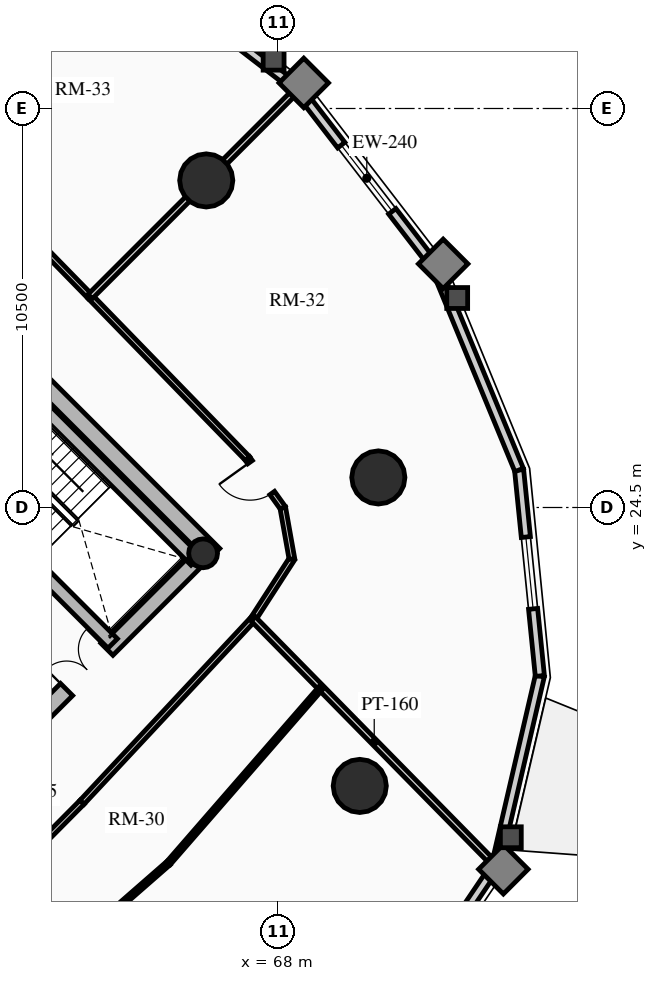
"""IFC4 building model, lengths in metres.
Left out: names, types, materials, properties, quantities, classifications, styles, units other than length and angle.
Written with IfcOpenShell. Run it as: python <this file> out.ifc"""

import sys

from ifc_helpers import new_model, si_unit, direction, frame, frame_2d, origin, origin_2d, place, context, subcontext, project, spatial, rectangle, circle, hollow_circle, extrude, source, transform, mapped, element, fill, save


model = new_model("IFC4")
c1 = context("Model", 3, precision=1e-05, world=origin(), true_north=direction((0.0, 1.0)))
c2 = subcontext(c1, "Body", "Model", "MODEL_VIEW")
j1 = project(units=[si_unit("LENGTHUNIT", "METRE"), si_unit("PLANEANGLEUNIT", "RADIAN")], contexts=[c1])
p1 = place(None, origin())
s1 = spatial("IfcSite", under=j1, at=p1, CompositionType="ELEMENT")
p2 = place(p1, origin())
s2 = spatial("IfcBuilding", under=s1, at=p2, CompositionType="ELEMENT")
p3 = place(p2, frame((0.0, 0.0, 93.43)))
s3 = spatial("IfcBuildingStorey", under=s2, at=p3, CompositionType="ELEMENT", Elevation=93.43)
p4 = place(p3, frame((66.303, 23.263, 0.0), z_axis=(0.0, 0.0, 1.0), x_axis=(-0.707106781187, 0.707106781187, 0.0)))
e1 = element("IfcWall", 1, at=p4, inside=s3, PredefinedType="SHEAR", context=c2, shape_type="SweptSolid", body=[
    extrude(rectangle(XDim=14.2, YDim=0.45, at=frame_2d((7.1, 0.0))), origin(), (0.0, 0.0, 1.0), 2.91),
])
p5 = place(p3, frame((58.578, 15.856, 0.0), z_axis=(0.0, 0.0, 1.0), x_axis=(0.707106781187, 0.707106781187, 0.0)))
e2 = element("IfcWall", 2, at=p5, inside=s3, PredefinedType="SHEAR", context=c2, shape_type="SweptSolid", body=[
    extrude(rectangle(XDim=10.7, YDim=0.45, at=frame_2d((5.35, 0.0))), origin(), (0.0, 0.0, 1.0), 2.91),
])
m1 = source(origin(), c2, "Body", "SweptSolid", [
    extrude(rectangle(XDim=1.5, YDim=2.02, at=frame_2d((0.75, 1.01))), frame((0.0, 0.235, 0.0), z_axis=(0.0, -1.0, 0.0), x_axis=(1.0, 0.0, 0.0)), (0.0, 0.0, 1.0), 0.47),
])
p6 = place(p5, frame((5.45, 0.0, 0.0)))
e3 = element("IfcOpeningElement", 3, at=p6, cuts=e2, PredefinedType="OPENING", context=c2, shape_type="MappedRepresentation", body=[
    mapped(m1, transform((0.0, 0.0, 0.0), x_axis=(1.0, 0.0, 0.0), y_axis=(0.0, 1.0, 0.0), z_axis=(0.0, 0.0, 1.0), scale=1.0)),
])
p7 = place(p3, frame((63.645, 20.922, 0.0), z_axis=(0.0, 0.0, 1.0), x_axis=(-0.707106781187, 0.707106781187, 0.0)))
e4 = element("IfcWall", 4, at=p7, inside=s3, PredefinedType="SHEAR", context=c2, shape_type="SweptSolid", body=[
    extrude(rectangle(XDim=13.75, YDim=0.35, at=frame_2d((6.875, 0.0))), origin(), (0.0, 0.0, 1.0), 2.91),
])
m2 = source(origin(), c2, "Body", "SweptSolid", [
    extrude(rectangle(XDim=1.1, YDim=2.015, at=frame_2d((0.55, 1.007))), frame((0.0, 0.185, 0.0), z_axis=(0.0, -1.0, 0.0), x_axis=(1.0, 0.0, 0.0)), (0.0, 0.0, 1.0), 0.37),
])
p8 = place(p7, frame((10.0, 0.0, 0.0)))
e5 = element("IfcOpeningElement", 5, at=p8, cuts=e4, PredefinedType="OPENING", context=c2, shape_type="MappedRepresentation", body=[
    mapped(m2, transform((0.0, 0.0, 0.0), x_axis=(1.0, 0.0, 0.0), y_axis=(0.0, 1.0, 0.0), z_axis=(0.0, 0.0, 1.0), scale=1.0)),
])
p9 = place(p7, frame((12.0, 0.0, 0.0)))
e6 = element("IfcOpeningElement", 6, at=p9, cuts=e4, PredefinedType="OPENING", context=c2, shape_type="MappedRepresentation", body=[
    mapped(m2, transform((0.0, 0.0, 0.0), x_axis=(1.0, 0.0, 0.0), y_axis=(0.0, 1.0, 0.0), z_axis=(0.0, 0.0, 1.0), scale=1.0)),
])
m3 = source(origin(), c2, "Body", "SweptSolid", [
    extrude(rectangle(XDim=1.15, YDim=2.02, at=frame_2d((0.575, 1.01))), frame((0.0, 0.185, 0.0), z_axis=(0.0, -1.0, 0.0), x_axis=(1.0, 0.0, 0.0)), (0.0, 0.0, 1.0), 0.37),
])
p10 = place(p7, frame((5.305, 0.0, 0.0)))
e7 = element("IfcOpeningElement", 7, at=p10, cuts=e4, PredefinedType="OPENING", context=c2, shape_type="MappedRepresentation", body=[
    mapped(m3, transform((0.0, 0.0, 0.0), x_axis=(1.0, 0.0, 0.0), y_axis=(0.0, 1.0, 0.0), z_axis=(0.0, 0.0, 1.0), scale=1.0)),
])
p11 = place(p3, frame((65.83, 23.107, 0.0), z_axis=(0.0, 0.0, 1.0), x_axis=(-0.707088616009, 0.707124945897, 0.0)))
e8 = element("IfcWall", 8, at=p11, inside=s3, PredefinedType="SHEAR", context=c2, shape_type="SweptSolid", body=[
    extrude(rectangle(XDim=6.72, YDim=0.35, at=frame_2d((3.36, 0.0))), origin(), (0.0, 0.0, 1.0), 2.91),
])
p12 = place(p3, frame((66.024, 23.294, 0.0), z_axis=(0.0, 0.0, 1.0), x_axis=(0.707106781187, 0.707106781187, 0.0)))
e9 = element("IfcColumn", 9, at=p12, inside=s3, PredefinedType="COLUMN", context=c2, shape_type="SweptSolid", body=[
    extrude(hollow_circle(Radius=0.38, WallThickness=0.032, at=origin_2d()), origin(), (0.0, 0.0, 1.0), 2.91),
])
for number, where, z_axis, x_axis in (
    (10, (66.107, 33.107, 0.0), (0.0, 0.0, 1.0), (1.0, 0.0, 0.0)),
    (11, (70.146, 17.173, 0.0), (0.0, 0.0, 1.0), (1.0, 0.0, 0.0)),
    (12, (70.635, 25.291, 0.0), (0.0, 0.0, 1.0), (1.0, 0.0, 0.0)),
):
    element("IfcColumn", number, at=place(p3, frame(where, z_axis=z_axis, x_axis=x_axis)), inside=s3, PredefinedType="USERDEFINED", context=c2, shape_type="SweptSolid", body=[
        extrude(circle(Radius=0.7, at=origin_2d()), origin(), (0.0, 0.0, 1.0), 2.91),
    ])
p13 = place(p3, frame((63.811, 39.145, 0.0), z_axis=(0.0, 0.0, 1.0), x_axis=(0.791982052206, -0.61054437102, 0.0)))
e13 = element("IfcWall", 13, at=p13, inside=s3, PredefinedType="SOLIDWALL", context=c2, shape_type="SweptSolid", body=[
    extrude(rectangle(XDim=5.942, YDim=0.24, at=frame_2d((2.971, 0.0))), origin(), (0.0, 0.0, 1.0), 2.179),
])
p14 = place(p3, frame((73.729, 15.08, 0.0), z_axis=(0.0, 0.0, 1.0), x_axis=(-0.559572880421, -0.828781148131, 0.0)))
e14 = element("IfcWall", 14, at=p14, inside=s3, PredefinedType="SOLIDWALL", context=c2, shape_type="SweptSolid", body=[
    extrude(rectangle(XDim=4.905, YDim=0.24, at=frame_2d((2.452, 0.0))), origin(), (0.0, 0.0, 1.0), 2.179),
])
m4 = source(origin(), c2, "Body", "SweptSolid", [
    extrude(rectangle(XDim=1.9, YDim=1.35, at=frame_2d((0.95, 0.675))), frame((0.0, 0.13, 0.0), z_axis=(0.0, -1.0, 0.0), x_axis=(1.0, 0.0, 0.0)), (0.0, 0.0, 1.0), 0.26),
])
p15 = place(p14, frame((1.502, 0.0, 0.65)))
e15 = element("IfcOpeningElement", 15, at=p15, cuts=e14, PredefinedType="OPENING", context=c2, shape_type="MappedRepresentation", body=[
    mapped(m4, transform((0.0, 0.0, 0.0), x_axis=(1.0, 0.0, 0.0), y_axis=(0.0, 1.0, 0.0), z_axis=(0.0, 0.0, 1.0), scale=1.0)),
])
p16 = place(p3, frame((74.885, 20.067, 0.0), z_axis=(0.0, 0.0, 1.0), x_axis=(-0.225834725257, -0.974165631126, 0.0)))
e16 = element("IfcWall", 16, at=p16, inside=s3, PredefinedType="SOLIDWALL", context=c2, shape_type="SweptSolid", body=[
    extrude(rectangle(XDim=5.119, YDim=0.24, at=frame_2d((2.56, 0.0))), origin(), (0.0, 0.0, 1.0), 2.179),
])
p17 = place(p3, frame((74.339, 25.487, 0.0), z_axis=(0.0, 0.0, 1.0), x_axis=(0.10015591906, -0.994971754311, 0.0)))
e17 = element("IfcWall", 17, at=p17, inside=s3, PredefinedType="SOLIDWALL", context=c2, shape_type="SweptSolid", body=[
    extrude(rectangle(XDim=5.448, YDim=0.24, at=frame_2d((2.724, 0.0))), origin(), (0.0, 0.0, 1.0), 2.179),
])
p18 = place(p17, frame((1.774, 0.0, 0.65)))
e18 = element("IfcOpeningElement", 18, at=p18, cuts=e17, PredefinedType="OPENING", context=c2, shape_type="MappedRepresentation", body=[
    mapped(m4, transform((0.0, 0.0, 0.0), x_axis=(1.0, 0.0, 0.0), y_axis=(0.0, 1.0, 0.0), z_axis=(0.0, 0.0, 1.0), scale=1.0)),
])
p19 = place(p3, frame((72.145, 30.811, 0.0), z_axis=(0.0, 0.0, 1.0), x_axis=(0.381027003055, -0.924563909604, 0.0)))
e19 = element("IfcWall", 19, at=p19, inside=s3, PredefinedType="SOLIDWALL", context=c2, shape_type="SweptSolid", body=[
    extrude(rectangle(XDim=5.758, YDim=0.24, at=frame_2d((2.879, 0.0))), origin(), (0.0, 0.0, 1.0), 2.179),
])
p20 = place(p3, frame((68.517, 35.517, 0.0), z_axis=(0.0, 0.0, 1.0), x_axis=(0.61054437102, -0.791982052206, 0.0)))
e20 = element("IfcWall", 20, at=p20, inside=s3, PredefinedType="SOLIDWALL", context=c2, shape_type="SweptSolid", body=[
    extrude(rectangle(XDim=5.942, YDim=0.24, at=frame_2d((2.971, 0.0))), origin(), (0.0, 0.0, 1.0), 2.179),
])
m5 = source(origin(), c2, "Body", "SweptSolid", [
    extrude(rectangle(XDim=2.2, YDim=1.35, at=frame_2d((1.1, 0.675))), frame((0.0, 0.13, 0.0), z_axis=(0.0, -1.0, 0.0), x_axis=(1.0, 0.0, 0.0)), (0.0, 0.0, 1.0), 0.26),
])
p21 = place(p20, frame((1.871, 0.0, 0.65)))
e21 = element("IfcOpeningElement", 21, at=p21, cuts=e20, PredefinedType="OPENING", context=c2, shape_type="MappedRepresentation", body=[
    mapped(m5, transform((0.0, 0.0, 0.0), x_axis=(1.0, 0.0, 0.0), y_axis=(0.0, 1.0, 0.0), z_axis=(0.0, 0.0, 1.0), scale=1.0)),
])
p22 = place(p3, frame((63.051, 30.051, 0.0), z_axis=(0.0, 0.0, 1.0), x_axis=(-0.698846622234, 0.715271555839, 0.0)))
e22 = element("IfcWall", 22, at=p22, inside=s3, PredefinedType="PARTITIONING", context=c2, shape_type="SweptSolid", body=[
    extrude(rectangle(XDim=6.05, YDim=0.15, at=frame_2d((3.025, 0.0))), origin(), (0.0, 0.0, 1.0), 2.225),
])
p23 = place(p3, frame((60.515, 14.401, 0.0), z_axis=(0.0, 0.0, 1.0), x_axis=(0.704179607439, 0.710021887316, 0.0)))
e23 = element("IfcWall", 23, at=p23, inside=s3, PredefinedType="PARTITIONING", context=c2, shape_type="SweptSolid", body=[
    extrude(rectangle(XDim=3.301, YDim=0.15, at=frame_2d((1.651, 0.0))), origin(), (0.0, 0.0, 1.0), 2.225),
])
p24 = place(p3, frame((62.839, 16.745, 0.0), z_axis=(0.0, 0.0, 1.0), x_axis=(0.682386779427, 0.73099130177, 0.0)))
e24 = element("IfcWall", 24, at=p24, inside=s3, PredefinedType="PARTITIONING", context=c2, shape_type="SweptSolid", body=[
    extrude(rectangle(XDim=6.6, YDim=0.15, at=frame_2d((3.3, 0.0))), origin(), (0.0, 0.0, 1.0), 2.225),
])
p25 = place(p3, frame((67.343, 21.569, 0.0), z_axis=(0.0, 0.0, 1.0), x_axis=(0.542722446786, 0.83991210597, 0.0)))
e25 = element("IfcWall", 25, at=p25, inside=s3, PredefinedType="PARTITIONING", context=c2, shape_type="SweptSolid", body=[
    extrude(rectangle(XDim=1.876, YDim=0.15, at=frame_2d((0.938, 0.0))), origin(), (0.0, 0.0, 1.0), 2.225),
])
p26 = place(p3, frame((68.362, 23.145, 0.0), z_axis=(0.0, 0.0, 1.0), x_axis=(-0.175605524171, 0.984460613677, 0.0)))
e26 = element("IfcWall", 26, at=p26, inside=s3, PredefinedType="PARTITIONING", context=c2, shape_type="SweptSolid", body=[
    extrude(rectangle(XDim=1.369, YDim=0.15, at=frame_2d((0.685, 0.0))), origin(), (0.0, 0.0, 1.0), 2.225),
])
p27 = place(p3, frame((68.121, 24.493, 0.0), z_axis=(0.0, 0.0, 1.0), x_axis=(-0.583188677624, 0.812336732083, 0.0)))
e27 = element("IfcWall", 27, at=p27, inside=s3, PredefinedType="PARTITIONING", context=c2, shape_type="SweptSolid", body=[
    extrude(rectangle(XDim=1.597, YDim=0.15, at=frame_2d((0.799, 0.0))), origin(), (0.0, 0.0, 1.0), 2.225),
])
m6 = source(origin(), c2, "Body", "SweptSolid", [
    extrude(rectangle(XDim=1.0, YDim=2.015, at=frame_2d((0.5, 1.007))), frame((0.0, 0.085, 0.0), z_axis=(0.0, -1.0, 0.0), x_axis=(1.0, 0.0, 0.0)), (0.0, 0.0, 1.0), 0.17),
])
p28 = place(p27, frame((0.477, 0.0, 0.0)))
e28 = element("IfcOpeningElement", 28, at=p28, cuts=e27, PredefinedType="OPENING", context=c2, shape_type="MappedRepresentation", body=[
    mapped(m6, transform((0.0, 0.0, 0.0), x_axis=(1.0, 0.0, 0.0), y_axis=(0.0, 1.0, 0.0), z_axis=(0.0, 0.0, 1.0), scale=1.0)),
])
p29 = place(p3, frame((67.19, 25.791, 0.0), z_axis=(0.0, 0.0, 1.0), x_axis=(-0.696839457851, 0.717227139742, 0.0)))
e29 = element("IfcWall", 29, at=p29, inside=s3, PredefinedType="PARTITIONING", context=c2, shape_type="SweptSolid", body=[
    extrude(rectangle(XDim=5.939, YDim=0.15, at=frame_2d((2.97, 0.0))), origin(), (0.0, 0.0, 1.0), 2.655),
])
p30 = place(p3, frame((63.051, 30.051, 0.0), z_axis=(0.0, 0.0, 1.0), x_axis=(0.707106781187, 0.707106781187, 0.0)))
e30 = element("IfcWall", 30, at=p30, inside=s3, PredefinedType="PARTITIONING", context=c2, shape_type="SweptSolid", body=[
    extrude(rectangle(XDim=7.711, YDim=0.16, at=frame_2d((3.855, 0.0))), origin(), (0.0, 0.0, 1.0), 2.179),
])
p31 = place(p3, frame((67.343, 21.569, 0.0), z_axis=(0.0, 0.0, 1.0), x_axis=(0.700899237588, -0.713260302238, 0.0)))
e31 = element("IfcWall", 31, at=p31, inside=s3, PredefinedType="PARTITIONING", context=c2, shape_type="SweptSolid", body=[
    extrude(rectangle(XDim=9.085, YDim=0.16, at=frame_2d((4.543, 0.0))), origin(), (0.0, 0.0, 1.0), 2.179),
])
p32 = place(p3, frame((62.306, 12.689, 0.0), z_axis=(0.0, 0.0, 1.0), x_axis=(0.753127589311, 0.657874482115, 0.0)))
e32 = element("IfcWall", 32, at=p32, inside=s3, PredefinedType="PARTITIONING", context=c2, shape_type="SweptSolid", body=[
    extrude(rectangle(XDim=3.732, YDim=0.125, at=frame_2d((1.866, 0.0))), origin(), (0.0, 0.0, 1.0), 2.225),
])
p33 = place(p3, frame((65.116, 15.145, 0.0), z_axis=(0.0, 0.0, 1.0), x_axis=(0.656272685344, 0.75452379848, 0.0)))
e33 = element("IfcWall", 33, at=p33, inside=s3, PredefinedType="PARTITIONING", context=c2, shape_type="SweptSolid", body=[
    extrude(rectangle(XDim=6.11, YDim=0.125, at=frame_2d((3.055, 0.0))), origin(), (0.0, 0.0, 1.0), 2.225),
])
m7 = source(origin(), c2, "Body", "SweptSolid", [
    extrude(rectangle(XDim=1.9, YDim=1.35, at=frame_2d((0.95, 0.675))), frame((0.0, 0.03, 0.0), z_axis=(0.0, -1.0, 0.0), x_axis=(1.0, 0.0, 0.0)), (0.0, 0.0, 1.0), 0.06),
])
p34 = place(p18, origin())
e34 = element("IfcWindow", 34, at=p34, inside=s3, PartitioningType="DOUBLE_PANEL_VERTICAL", PredefinedType="WINDOW", context=c2, shape_type="MappedRepresentation", body=[
    mapped(m7, transform((0.0, 0.0, 0.0), x_axis=(1.0, 0.0, 0.0), y_axis=(0.0, 1.0, 0.0), z_axis=(0.0, 0.0, 1.0), scale=1.0)),
])
fill(e18, e34)
m8 = source(origin(), c2, "Body", "SweptSolid", [
    extrude(rectangle(XDim=2.2, YDim=1.35, at=frame_2d((1.1, 0.675))), frame((0.0, 0.03, 0.0), z_axis=(0.0, -1.0, 0.0), x_axis=(1.0, 0.0, 0.0)), (0.0, 0.0, 1.0), 0.06),
])
p35 = place(p21, origin())
e35 = element("IfcWindow", 35, at=p35, inside=s3, PartitioningType="DOUBLE_PANEL_VERTICAL", PredefinedType="WINDOW", context=c2, shape_type="MappedRepresentation", body=[
    mapped(m8, transform((0.0, 0.0, 0.0), x_axis=(1.0, 0.0, 0.0), y_axis=(0.0, 1.0, 0.0), z_axis=(0.0, 0.0, 1.0), scale=1.0)),
])
fill(e21, e35)
m9 = source(origin(), c2, "Body", "SweptSolid", [
    extrude(rectangle(XDim=1.5, YDim=2.02, at=frame_2d((0.75, 1.01))), frame((0.0, 0.025, 0.0), z_axis=(0.0, -1.0, 0.0), x_axis=(1.0, 0.0, 0.0)), (0.0, 0.0, 1.0), 0.05),
])
p36 = place(p6, origin())
e36 = element("IfcDoor", 36, at=p36, inside=s3, OperationType="DOUBLE_DOOR_SINGLE_SWING", PredefinedType="DOOR", context=c2, shape_type="MappedRepresentation", body=[
    mapped(m9, transform((0.0, 0.0, 0.0), x_axis=(1.0, 0.0, 0.0), y_axis=(0.0, 1.0, 0.0), z_axis=(0.0, 0.0, 1.0), scale=1.0)),
])
fill(e3, e36)
m10 = source(origin(), c2, "Body", "SweptSolid", [
    extrude(rectangle(XDim=1.0, YDim=2.015, at=frame_2d((0.5, 1.007))), frame((0.0, 0.025, 0.0), z_axis=(0.0, -1.0, 0.0), x_axis=(1.0, 0.0, 0.0)), (0.0, 0.0, 1.0), 0.05),
])
p37 = place(p28, origin())
e37 = element("IfcDoor", 37, at=p37, inside=s3, OperationType="SINGLE_SWING_RIGHT", PredefinedType="DOOR", context=c2, shape_type="MappedRepresentation", body=[
    mapped(m10, transform((0.0, 0.0, 0.0), x_axis=(1.0, 0.0, 0.0), y_axis=(0.0, 1.0, 0.0), z_axis=(0.0, 0.0, 1.0), scale=1.0)),
])
fill(e28, e37)
save(model, sys.argv[1])
